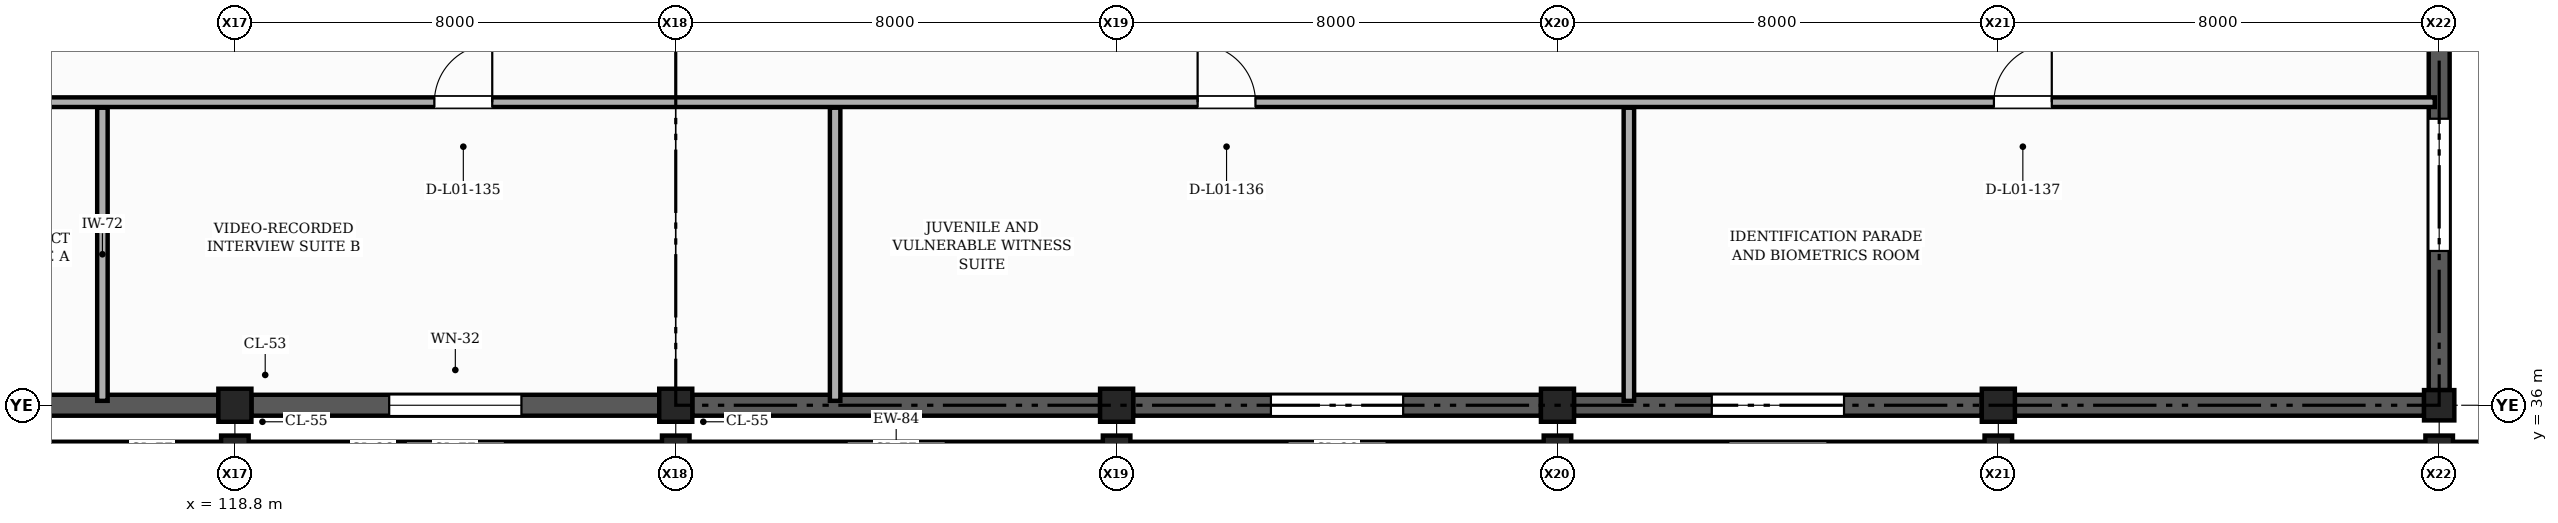
"""IFC4 building model, lengths in metres.
Left out: names, types, materials, properties, quantities, classifications, styles, units other than length and angle.
Written with IfcOpenShell. Run it as: python <this file> out.ifc"""

import sys

from ifc_helpers import new_model, si_unit, direction, frame, frame_2d, origin, origin_2d, place, context, subcontext, project, spatial, polyline, rectangle, outline, extrude, element, fill, save


model = new_model("IFC4")
c1 = context("Model", 3, precision=1e-05, world=origin(), true_north=direction((0.0, 1.0)))
c2 = subcontext(c1, "Body", "Model", "MODEL_VIEW")
j1 = project(units=[si_unit("LENGTHUNIT", "METRE"), si_unit("PLANEANGLEUNIT", "RADIAN")], contexts=[c1])
p1 = place(None, origin())
s1 = spatial("IfcSite", under=j1, at=p1, CompositionType="ELEMENT")
p2 = place(p1, origin())
s2 = spatial("IfcBuilding", under=s1, at=p2, CompositionType="ELEMENT")
p3 = place(p2, frame((0.0, 0.0, 4.8)))
s3 = spatial("IfcBuildingStorey", under=s2, at=p3, CompositionType="ELEMENT", Elevation=4.8)
p4 = place(p3, frame((118.8, 35.2, 0.0), z_axis=(0.0, 0.0, 1.0), x_axis=(1.0, 0.0, 0.0)))
e1 = element("IfcColumn", 1, at=p4, inside=s3, PredefinedType="COLUMN", context=c2, shape_type="SweptSolid", body=[
    extrude(rectangle(XDim=0.5, YDim=0.5, at=origin_2d()), origin(), (0.0, 0.0, 1.0), 4.2),
])
p5 = place(p3, frame((118.8, 36.0, 0.0), z_axis=(0.0, 0.0, 1.0), x_axis=(1.0, 0.0, 0.0)))
e2 = element("IfcColumn", 2, at=p5, inside=s3, PredefinedType="COLUMN", context=c2, shape_type="SweptSolid", body=[
    extrude(rectangle(XDim=0.6, YDim=0.6, at=origin_2d()), origin(), (0.0, 0.0, 1.0), 4.2),
])
p6 = place(p3, frame((126.8, 35.2, 0.0), z_axis=(0.0, 0.0, 1.0), x_axis=(1.0, 0.0, 0.0)))
e3 = element("IfcColumn", 3, at=p6, inside=s3, PredefinedType="COLUMN", context=c2, shape_type="SweptSolid", body=[
    extrude(rectangle(XDim=0.5, YDim=0.5, at=origin_2d()), origin(), (0.0, 0.0, 1.0), 4.2),
])
p7 = place(p3, frame((126.8, 36.0, 0.0), z_axis=(0.0, 0.0, 1.0), x_axis=(1.0, 0.0, 0.0)))
e4 = element("IfcColumn", 4, at=p7, inside=s3, PredefinedType="COLUMN", context=c2, shape_type="SweptSolid", body=[
    extrude(rectangle(XDim=0.6, YDim=0.6, at=origin_2d()), origin(), (0.0, 0.0, 1.0), 4.2),
])
p8 = place(p3, frame((134.8, 35.2, 0.0), z_axis=(0.0, 0.0, 1.0), x_axis=(1.0, 0.0, 0.0)))
e5 = element("IfcColumn", 5, at=p8, inside=s3, PredefinedType="COLUMN", context=c2, shape_type="SweptSolid", body=[
    extrude(rectangle(XDim=0.5, YDim=0.5, at=origin_2d()), origin(), (0.0, 0.0, 1.0), 4.2),
])
p9 = place(p3, frame((134.8, 36.0, 0.0), z_axis=(0.0, 0.0, 1.0), x_axis=(1.0, 0.0, 0.0)))
e6 = element("IfcColumn", 6, at=p9, inside=s3, PredefinedType="COLUMN", context=c2, shape_type="SweptSolid", body=[
    extrude(rectangle(XDim=0.6, YDim=0.6, at=origin_2d()), origin(), (0.0, 0.0, 1.0), 4.2),
])
p10 = place(p3, frame((142.8, 35.2, 0.0), z_axis=(0.0, 0.0, 1.0), x_axis=(1.0, 0.0, 0.0)))
e7 = element("IfcColumn", 7, at=p10, inside=s3, PredefinedType="COLUMN", context=c2, shape_type="SweptSolid", body=[
    extrude(rectangle(XDim=0.5, YDim=0.5, at=origin_2d()), origin(), (0.0, 0.0, 1.0), 4.2),
])
p11 = place(p3, frame((142.8, 36.0, 0.0), z_axis=(0.0, 0.0, 1.0), x_axis=(1.0, 0.0, 0.0)))
e8 = element("IfcColumn", 8, at=p11, inside=s3, PredefinedType="COLUMN", context=c2, shape_type="SweptSolid", body=[
    extrude(rectangle(XDim=0.6, YDim=0.6, at=origin_2d()), origin(), (0.0, 0.0, 1.0), 4.2),
])
p12 = place(p3, frame((150.8, 35.2, 0.0), z_axis=(0.0, 0.0, 1.0), x_axis=(1.0, 0.0, 0.0)))
e9 = element("IfcColumn", 9, at=p12, inside=s3, PredefinedType="COLUMN", context=c2, shape_type="SweptSolid", body=[
    extrude(rectangle(XDim=0.5, YDim=0.5, at=origin_2d()), origin(), (0.0, 0.0, 1.0), 4.2),
])
p13 = place(p3, frame((150.8, 36.0, 0.0), z_axis=(0.0, 0.0, 1.0), x_axis=(1.0, 0.0, 0.0)))
e10 = element("IfcColumn", 10, at=p13, inside=s3, PredefinedType="COLUMN", context=c2, shape_type="SweptSolid", body=[
    extrude(rectangle(XDim=0.6, YDim=0.6, at=origin_2d()), origin(), (0.0, 0.0, 1.0), 4.2),
])
p14 = place(p3, frame((158.8, 35.2, 0.0), z_axis=(0.0, 0.0, 1.0), x_axis=(1.0, 0.0, 0.0)))
e11 = element("IfcColumn", 11, at=p14, inside=s3, PredefinedType="COLUMN", context=c2, shape_type="SweptSolid", body=[
    extrude(rectangle(XDim=0.5, YDim=0.5, at=origin_2d()), origin(), (0.0, 0.0, 1.0), 4.2),
])
p15 = place(p3, frame((158.8, 36.0, 0.0), z_axis=(0.0, 0.0, 1.0), x_axis=(1.0, 0.0, 0.0)))
e12 = element("IfcColumn", 12, at=p15, inside=s3, PredefinedType="COLUMN", context=c2, shape_type="SweptSolid", body=[
    extrude(rectangle(XDim=0.55, YDim=0.55, at=origin_2d()), origin(), (0.0, 0.0, 1.0), 4.2),
])
p16 = place(p3, frame((166.55, 35.2, 0.0), z_axis=(0.0, 0.0, 1.0), x_axis=(-1.0, 0.0, 0.0)))
e13 = element("IfcWall", 13, at=p16, inside=s3, PredefinedType="SOLIDWALL", context=c2, shape_type="SweptSolid", body=[
    extrude(rectangle(XDim=7.5, YDim=0.275, at=frame_2d((3.75, 0.0))), origin(), (0.0, 0.0, 1.0), 3.333),
])
p17 = place(p16, frame((2.85, 0.0, 1.6)))
e14 = element("IfcOpeningElement", 14, at=p17, cuts=e13, PredefinedType="OPENING", context=c2, shape_type="SweptSolid", body=[
    extrude(rectangle(XDim=1.8, YDim=0.75, at=frame_2d((0.9, 0.375))), frame((0.0, 0.147, 0.0), z_axis=(0.0, -1.0, 0.0), x_axis=(1.0, 0.0, 0.0)), (0.0, 0.0, 1.0), 0.295),
])
p18 = place(p3, frame((158.55, 35.2, 0.0), z_axis=(0.0, 0.0, 1.0), x_axis=(-1.0, 0.0, 0.0)))
e15 = element("IfcWall", 15, at=p18, inside=s3, PredefinedType="SOLIDWALL", context=c2, shape_type="SweptSolid", body=[
    extrude(rectangle(XDim=7.5, YDim=0.275, at=frame_2d((3.75, 0.0))), origin(), (0.0, 0.0, 1.0), 3.91),
])
p19 = place(p3, frame((150.55, 35.2, 0.0), z_axis=(0.0, 0.0, 1.0), x_axis=(-1.0, 0.0, 0.0)))
e16 = element("IfcWall", 16, at=p19, inside=s3, PredefinedType="SOLIDWALL", context=c2, shape_type="SweptSolid", body=[
    extrude(rectangle(XDim=7.5, YDim=0.275, at=frame_2d((3.75, 0.0))), origin(), (0.0, 0.0, 1.0), 3.333),
])
p20 = place(p19, frame((2.85, 0.0, 1.6)))
e17 = element("IfcOpeningElement", 17, at=p20, cuts=e16, PredefinedType="OPENING", context=c2, shape_type="SweptSolid", body=[
    extrude(rectangle(XDim=1.8, YDim=0.75, at=frame_2d((0.9, 0.375))), frame((0.0, 0.147, 0.0), z_axis=(0.0, -1.0, 0.0), x_axis=(1.0, 0.0, 0.0)), (0.0, 0.0, 1.0), 0.295),
])
p21 = place(p3, frame((142.55, 35.2, 0.0), z_axis=(0.0, 0.0, 1.0), x_axis=(-1.0, 0.0, 0.0)))
e18 = element("IfcWall", 18, at=p21, inside=s3, PredefinedType="SOLIDWALL", context=c2, shape_type="SweptSolid", body=[
    extrude(rectangle(XDim=7.5, YDim=0.275, at=frame_2d((3.75, 0.0))), origin(), (0.0, 0.0, 1.0), 3.333),
])
p22 = place(p21, frame((2.85, 0.0, 1.6)))
e19 = element("IfcOpeningElement", 19, at=p22, cuts=e18, PredefinedType="OPENING", context=c2, shape_type="SweptSolid", body=[
    extrude(rectangle(XDim=1.8, YDim=0.75, at=frame_2d((0.9, 0.375))), frame((0.0, 0.147, 0.0), z_axis=(0.0, -1.0, 0.0), x_axis=(1.0, 0.0, 0.0)), (0.0, 0.0, 1.0), 0.295),
])
p23 = place(p3, frame((134.55, 35.2, 0.0), z_axis=(0.0, 0.0, 1.0), x_axis=(-1.0, 0.0, 0.0)))
e20 = element("IfcWall", 20, at=p23, inside=s3, PredefinedType="SOLIDWALL", context=c2, shape_type="SweptSolid", body=[
    extrude(rectangle(XDim=7.5, YDim=0.275, at=frame_2d((3.75, 0.0))), origin(), (0.0, 0.0, 1.0), 3.333),
])
p24 = place(p23, frame((2.85, 0.0, 1.6)))
e21 = element("IfcOpeningElement", 21, at=p24, cuts=e20, PredefinedType="OPENING", context=c2, shape_type="SweptSolid", body=[
    extrude(rectangle(XDim=1.8, YDim=0.75, at=frame_2d((0.9, 0.375))), frame((0.0, 0.147, 0.0), z_axis=(0.0, -1.0, 0.0), x_axis=(1.0, 0.0, 0.0)), (0.0, 0.0, 1.0), 0.295),
])
p25 = place(p3, frame((126.55, 35.2, 0.0), z_axis=(0.0, 0.0, 1.0), x_axis=(-1.0, 0.0, 0.0)))
e22 = element("IfcWall", 22, at=p25, inside=s3, PredefinedType="SOLIDWALL", context=c2, shape_type="SweptSolid", body=[
    extrude(rectangle(XDim=7.5, YDim=0.275, at=frame_2d((3.75, 0.0))), origin(), (0.0, 0.0, 1.0), 3.333),
])
p26 = place(p25, frame((2.85, 0.0, 1.6)))
e23 = element("IfcOpeningElement", 23, at=p26, cuts=e22, PredefinedType="OPENING", context=c2, shape_type="SweptSolid", body=[
    extrude(rectangle(XDim=1.8, YDim=0.75, at=frame_2d((0.9, 0.375))), frame((0.0, 0.147, 0.0), z_axis=(0.0, -1.0, 0.0), x_axis=(1.0, 0.0, 0.0)), (0.0, 0.0, 1.0), 0.295),
])
p27 = place(p3, frame((118.55, 35.2, 0.0), z_axis=(0.0, 0.0, 1.0), x_axis=(-1.0, 0.0, 0.0)))
e24 = element("IfcWall", 24, at=p27, inside=s3, PredefinedType="SOLIDWALL", context=c2, shape_type="SweptSolid", body=[
    extrude(rectangle(XDim=7.5, YDim=0.275, at=frame_2d((3.75, 0.0))), origin(), (0.0, 0.0, 1.0), 3.91),
])
p28 = place(p3, frame((111.1, 36.0, 0.0), z_axis=(0.0, 0.0, 1.0), x_axis=(1.0, 0.0, 0.0)))
e25 = element("IfcWall", 25, at=p28, inside=s3, PredefinedType="SOLIDWALL", context=c2, shape_type="SweptSolid", body=[
    extrude(rectangle(XDim=7.4, YDim=0.38, at=frame_2d((3.7, 0.0))), origin(), (0.0, 0.0, 1.0), 3.16),
])
p29 = place(p3, frame((119.1, 36.0, 0.0), z_axis=(0.0, 0.0, 1.0), x_axis=(1.0, 0.0, 0.0)))
e26 = element("IfcWall", 26, at=p29, inside=s3, PredefinedType="SOLIDWALL", context=c2, shape_type="SweptSolid", body=[
    extrude(rectangle(XDim=7.4, YDim=0.38, at=frame_2d((3.7, 0.0))), origin(), (0.0, 0.0, 1.0), 3.16),
])
p30 = place(p29, frame((2.5, 0.0, 2.1)))
e27 = element("IfcOpeningElement", 27, at=p30, cuts=e26, PredefinedType="OPENING", context=c2, shape_type="SweptSolid", body=[
    extrude(rectangle(XDim=2.4, YDim=0.75, at=frame_2d((1.2, 0.375))), frame((0.0, 0.2, 0.0), z_axis=(0.0, -1.0, 0.0), x_axis=(1.0, 0.0, 0.0)), (0.0, 0.0, 1.0), 0.4),
])
p31 = place(p3, frame((127.1, 36.0, 0.0), z_axis=(0.0, 0.0, 1.0), x_axis=(1.0, 0.0, 0.0)))
e28 = element("IfcWall", 28, at=p31, inside=s3, PredefinedType="SOLIDWALL", context=c2, shape_type="SweptSolid", body=[
    extrude(rectangle(XDim=7.4, YDim=0.38, at=frame_2d((3.7, 0.0))), origin(), (0.0, 0.0, 1.0), 3.16),
])
p32 = place(p3, frame((135.1, 36.0, 0.0), z_axis=(0.0, 0.0, 1.0), x_axis=(1.0, 0.0, 0.0)))
e29 = element("IfcWall", 29, at=p32, inside=s3, PredefinedType="SOLIDWALL", context=c2, shape_type="SweptSolid", body=[
    extrude(rectangle(XDim=7.4, YDim=0.38, at=frame_2d((3.7, 0.0))), origin(), (0.0, 0.0, 1.0), 3.16),
])
p33 = place(p32, frame((2.5, 0.0, 2.1)))
e30 = element("IfcOpeningElement", 30, at=p33, cuts=e29, PredefinedType="OPENING", context=c2, shape_type="SweptSolid", body=[
    extrude(rectangle(XDim=2.4, YDim=0.75, at=frame_2d((1.2, 0.375))), frame((0.0, 0.2, 0.0), z_axis=(0.0, -1.0, 0.0), x_axis=(1.0, 0.0, 0.0)), (0.0, 0.0, 1.0), 0.4),
])
p34 = place(p3, frame((143.1, 36.0, 0.0), z_axis=(0.0, 0.0, 1.0), x_axis=(1.0, 0.0, 0.0)))
e31 = element("IfcWall", 31, at=p34, inside=s3, PredefinedType="SOLIDWALL", context=c2, shape_type="SweptSolid", body=[
    extrude(rectangle(XDim=7.4, YDim=0.38, at=frame_2d((3.7, 0.0))), origin(), (0.0, 0.0, 1.0), 3.16),
])
p35 = place(p34, frame((2.5, 0.0, 2.1)))
e32 = element("IfcOpeningElement", 32, at=p35, cuts=e31, PredefinedType="OPENING", context=c2, shape_type="SweptSolid", body=[
    extrude(rectangle(XDim=2.4, YDim=0.75, at=frame_2d((1.2, 0.375))), frame((0.0, 0.2, 0.0), z_axis=(0.0, -1.0, 0.0), x_axis=(1.0, 0.0, 0.0)), (0.0, 0.0, 1.0), 0.4),
])
p36 = place(p3, frame((151.1, 36.0, 0.0), z_axis=(0.0, 0.0, 1.0), x_axis=(1.0, 0.0, 0.0)))
e33 = element("IfcWall", 33, at=p36, inside=s3, PredefinedType="SOLIDWALL", context=c2, shape_type="SweptSolid", body=[
    extrude(rectangle(XDim=7.425, YDim=0.38, at=frame_2d((3.712, 0.0))), origin(), (0.0, 0.0, 1.0), 3.16),
])
p37 = place(p3, frame((158.8, 36.275, 0.0), z_axis=(0.0, 0.0, 1.0), x_axis=(0.0, 1.0, 0.0)))
e34 = element("IfcWall", 34, at=p37, inside=s3, PredefinedType="SOLIDWALL", context=c2, shape_type="SweptSolid", body=[
    extrude(rectangle(XDim=7.45, YDim=0.38, at=frame_2d((3.725, 0.0))), origin(), (0.0, 0.0, 1.0), 3.26),
])
p38 = place(p37, frame((2.525, 0.0, 2.1)))
e35 = element("IfcOpeningElement", 35, at=p38, cuts=e34, PredefinedType="OPENING", context=c2, shape_type="SweptSolid", body=[
    extrude(rectangle(XDim=2.4, YDim=0.75, at=frame_2d((1.2, 0.375))), frame((0.0, 0.2, 0.0), z_axis=(0.0, -1.0, 0.0), x_axis=(1.0, 0.0, 0.0)), (0.0, 0.0, 1.0), 0.4),
])
for number, where, z_axis, x_axis in (
    (36, (102.8, 35.2, 4.2), (0.0, 0.0, 1.0), (1.0, 0.0, 0.0)),
    (37, (118.8, 35.2, 4.2), (0.0, 0.0, 1.0), (1.0, 0.0, 0.0)),
    (38, (134.8, 35.2, 4.2), (0.0, 0.0, 1.0), (1.0, 0.0, 0.0)),
    (39, (150.8, 35.2, 4.2), (0.0, 0.0, 1.0), (1.0, 0.0, 0.0)),
):
    element("IfcWall", number, at=place(p3, frame(where, z_axis=z_axis, x_axis=x_axis)), inside=s3, PredefinedType="SOLIDWALL", context=c2, shape_type="SweptSolid", body=[
        extrude(outline(polyline([(0.0, 0.0), (16.0, 0.0), (16.0, 0.05), (8.0, 3.55), (0.0, 0.05), (0.0, 0.0)])), frame((0.0, 0.107, 0.0), z_axis=(0.0, -1.0, 0.0), x_axis=(1.0, 0.0, 0.0)), (0.0, 0.0, 1.0), 0.215),
    ])
for number, where, z_axis, x_axis in (
    (40, (116.396, 36.08, 0.0), (0.0, 0.0, 1.0), (0.0, 1.0, 0.0)),
    (41, (129.692, 36.08, 0.0), (0.0, 0.0, 1.0), (0.0, 1.0, 0.0)),
    (42, (144.096, 36.08, 0.0), (0.0, 0.0, 1.0), (0.0, 1.0, 0.0)),
):
    element("IfcWall", number, at=place(p3, frame(where, z_axis=z_axis, x_axis=x_axis)), inside=s3, PredefinedType="PARTITIONING", context=c2, shape_type="SweptSolid", body=[
        extrude(rectangle(XDim=5.32, YDim=0.19, at=frame_2d((2.66, 0.0))), origin(), (0.0, 0.0, 1.0), 3.145),
    ])
p39 = place(p3, frame((102.88, 41.5, 0.0), z_axis=(0.0, 0.0, 1.0), x_axis=(1.0, 0.0, 0.0)))
e43 = element("IfcWall", 43, at=p39, inside=s3, PredefinedType="PARTITIONING", context=c2, shape_type="SweptSolid", body=[
    extrude(rectangle(XDim=55.84, YDim=0.175, at=frame_2d((27.92, 0.0))), origin(), (0.0, 0.0, 1.0), 3.195),
])
p40 = place(p39, frame((6.21, 0.0, 0.0)))
e44 = element("IfcOpeningElement", 44, at=p40, cuts=e43, PredefinedType="OPENING", context=c2, shape_type="SweptSolid", body=[
    extrude(rectangle(XDim=1.05, YDim=2.1, at=frame_2d((0.525, 1.05))), frame((0.0, 0.098, 0.0), z_axis=(0.0, -1.0, 0.0), x_axis=(1.0, 0.0, 0.0)), (0.0, 0.0, 1.0), 0.195),
])
p41 = place(p39, frame((19.54, 0.0, 0.0)))
e45 = element("IfcOpeningElement", 45, at=p41, cuts=e43, PredefinedType="OPENING", context=c2, shape_type="SweptSolid", body=[
    extrude(rectangle(XDim=1.05, YDim=2.1, at=frame_2d((0.525, 1.05))), frame((0.0, 0.098, 0.0), z_axis=(0.0, -1.0, 0.0), x_axis=(1.0, 0.0, 0.0)), (0.0, 0.0, 1.0), 0.195),
])
p42 = place(p39, frame((33.39, 0.0, 0.0)))
e46 = element("IfcOpeningElement", 46, at=p42, cuts=e43, PredefinedType="OPENING", context=c2, shape_type="SweptSolid", body=[
    extrude(rectangle(XDim=1.05, YDim=2.1, at=frame_2d((0.525, 1.05))), frame((0.0, 0.098, 0.0), z_axis=(0.0, -1.0, 0.0), x_axis=(1.0, 0.0, 0.0)), (0.0, 0.0, 1.0), 0.195),
])
p43 = place(p39, frame((47.84, 0.0, 0.0)))
e47 = element("IfcOpeningElement", 47, at=p43, cuts=e43, PredefinedType="OPENING", context=c2, shape_type="SweptSolid", body=[
    extrude(rectangle(XDim=1.05, YDim=2.1, at=frame_2d((0.525, 1.05))), frame((0.0, 0.098, 0.0), z_axis=(0.0, -1.0, 0.0), x_axis=(1.0, 0.0, 0.0)), (0.0, 0.0, 1.0), 0.195),
])
p44 = place(p30, origin())
e48 = element("IfcWindow", 48, at=p44, inside=s3, PartitioningType="SINGLE_PANEL", PredefinedType="WINDOW", context=c2, shape_type="SweptSolid", body=[
    extrude(rectangle(XDim=2.4, YDim=0.75, at=frame_2d((1.2, 0.375))), frame((0.0, 0.03, 0.0), z_axis=(0.0, -1.0, 0.0), x_axis=(1.0, 0.0, 0.0)), (0.0, 0.0, 1.0), 0.06),
])
fill(e27, e48)
p45 = place(p33, origin())
e49 = element("IfcWindow", 49, at=p45, inside=s3, PartitioningType="SINGLE_PANEL", PredefinedType="WINDOW", context=c2, shape_type="SweptSolid", body=[
    extrude(rectangle(XDim=2.4, YDim=0.75, at=frame_2d((1.2, 0.375))), frame((0.0, 0.03, 0.0), z_axis=(0.0, -1.0, 0.0), x_axis=(1.0, 0.0, 0.0)), (0.0, 0.0, 1.0), 0.06),
])
fill(e30, e49)
p46 = place(p35, origin())
e50 = element("IfcWindow", 50, at=p46, inside=s3, PartitioningType="SINGLE_PANEL", PredefinedType="WINDOW", context=c2, shape_type="SweptSolid", body=[
    extrude(rectangle(XDim=2.4, YDim=0.75, at=frame_2d((1.2, 0.375))), frame((0.0, 0.03, 0.0), z_axis=(0.0, -1.0, 0.0), x_axis=(1.0, 0.0, 0.0)), (0.0, 0.0, 1.0), 0.06),
])
fill(e32, e50)
p47 = place(p38, origin())
e51 = element("IfcWindow", 51, at=p47, inside=s3, PartitioningType="SINGLE_PANEL", PredefinedType="WINDOW", context=c2, shape_type="SweptSolid", body=[
    extrude(rectangle(XDim=2.4, YDim=0.75, at=frame_2d((1.2, 0.375))), frame((0.0, 0.03, 0.0), z_axis=(0.0, -1.0, 0.0), x_axis=(1.0, 0.0, 0.0)), (0.0, 0.0, 1.0), 0.06),
])
fill(e35, e51)
p48 = place(p41, origin())
e52 = element("IfcDoor", 52, at=p48, inside=s3, OperationType="SINGLE_SWING_RIGHT", PredefinedType="DOOR", context=c2, shape_type="SweptSolid", body=[
    extrude(rectangle(XDim=1.05, YDim=2.1, at=frame_2d((0.525, 1.05))), frame((0.0, 0.025, 0.0), z_axis=(0.0, -1.0, 0.0), x_axis=(1.0, 0.0, 0.0)), (0.0, 0.0, 1.0), 0.05),
])
fill(e45, e52)
p49 = place(p42, origin())
e53 = element("IfcDoor", 53, at=p49, inside=s3, OperationType="SINGLE_SWING_LEFT", PredefinedType="DOOR", context=c2, shape_type="SweptSolid", body=[
    extrude(rectangle(XDim=1.05, YDim=2.1, at=frame_2d((0.525, 1.05))), frame((0.0, 0.025, 0.0), z_axis=(0.0, -1.0, 0.0), x_axis=(1.0, 0.0, 0.0)), (0.0, 0.0, 1.0), 0.05),
])
fill(e46, e53)
p50 = place(p43, origin())
e54 = element("IfcDoor", 54, at=p50, inside=s3, OperationType="SINGLE_SWING_RIGHT", PredefinedType="DOOR", context=c2, shape_type="SweptSolid", body=[
    extrude(rectangle(XDim=1.05, YDim=2.1, at=frame_2d((0.525, 1.05))), frame((0.0, 0.025, 0.0), z_axis=(0.0, -1.0, 0.0), x_axis=(1.0, 0.0, 0.0)), (0.0, 0.0, 1.0), 0.05),
])
fill(e47, e54)
save(model, sys.argv[1])
